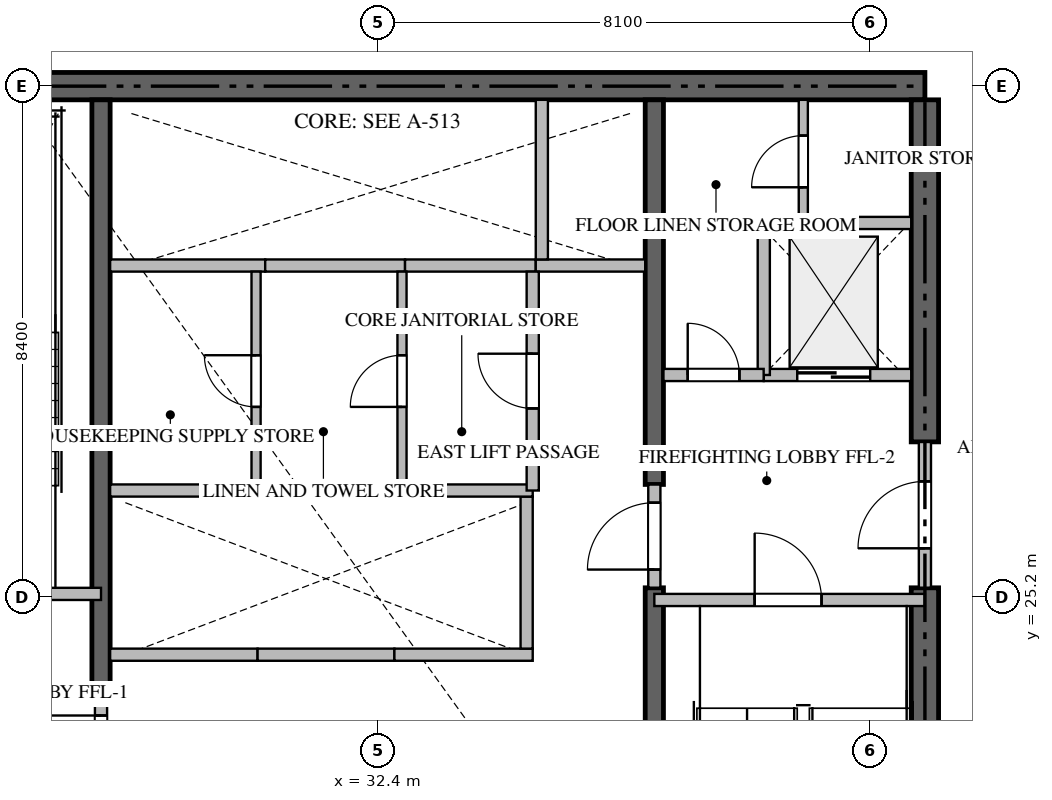
"""IFC4 building model, lengths in metres.
Left out: names, types, materials, properties, quantities, classifications, styles, units other than length and angle.
Written with IfcOpenShell. Run it as: python <this file> out.ifc"""

import sys

from ifc_helpers import new_model, si_unit, direction, frame, frame_2d, origin, place, context, subcontext, project, spatial, rectangle, extrude, source, transform, mapped, element, fill, save


model = new_model("IFC4")
c1 = context("Model", 3, precision=1e-05, world=origin(), true_north=direction((0.0, 1.0)))
c2 = subcontext(c1, "Body", "Model", "MODEL_VIEW")
j1 = project(units=[si_unit("LENGTHUNIT", "METRE"), si_unit("PLANEANGLEUNIT", "RADIAN")], contexts=[c1])
p1 = place(None, origin())
s1 = spatial("IfcSite", under=j1, at=p1, CompositionType="ELEMENT")
p2 = place(p1, origin())
s2 = spatial("IfcBuilding", under=s1, at=p2, CompositionType="ELEMENT")
p3 = place(p2, frame((0.0, 0.0, 97.95)))
s3 = spatial("IfcBuildingStorey", under=s2, at=p3, CompositionType="ELEMENT", Elevation=97.95)
p4 = place(p3, frame((41.4, 33.6, -0.26), z_axis=(0.0, 0.0, 1.0), x_axis=(-1.0, 0.0, 0.0)))
e1 = element("IfcWall", 1, at=p4, inside=s3, PredefinedType="SHEAR", context=c2, shape_type="SweptSolid", body=[
    extrude(rectangle(XDim=18.0, YDim=0.45, at=frame_2d((9.0, 0.0))), origin(), (0.0, 0.0, 1.0), 3.748),
])
p5 = place(p3, frame((41.4, 17.025, -0.26), z_axis=(0.0, 0.0, 1.0), x_axis=(0.0, 1.0, 0.0)))
e2 = element("IfcWall", 2, at=p5, inside=s3, PredefinedType="SHEAR", context=c2, shape_type="SweptSolid", body=[
    extrude(rectangle(XDim=8.325, YDim=0.45, at=frame_2d((4.163, 0.0))), origin(), (0.0, 0.0, 1.0), 3.748),
])
p6 = place(p3, frame((41.4, 27.75, -0.26), z_axis=(0.0, 0.0, 1.0), x_axis=(0.0, 1.0, 0.0)))
e3 = element("IfcWall", 3, at=p6, inside=s3, PredefinedType="SHEAR", context=c2, shape_type="SweptSolid", body=[
    extrude(rectangle(XDim=5.625, YDim=0.45, at=frame_2d((2.812, 0.0))), origin(), (0.0, 0.0, 1.0), 3.748),
])
p7 = place(p3, frame((27.85, 23.55, -0.26), z_axis=(0.0, 0.0, 1.0), x_axis=(0.0, 1.0, 0.0)))
e4 = element("IfcWall", 4, at=p7, inside=s3, PredefinedType="SHEAR", context=c2, shape_type="SweptSolid", body=[
    extrude(rectangle(XDim=9.825, YDim=0.3, at=frame_2d((4.913, 0.0))), origin(), (0.0, 0.0, 1.0), 3.748),
])
p8 = place(p3, frame((36.95, 17.025, -0.26), z_axis=(0.0, 0.0, 1.0), x_axis=(0.0, 1.0, 0.0)))
e5 = element("IfcWall", 5, at=p8, inside=s3, PredefinedType="SHEAR", context=c2, shape_type="SweptSolid", body=[
    extrude(rectangle(XDim=8.325, YDim=0.3, at=frame_2d((4.163, 0.0))), origin(), (0.0, 0.0, 1.0), 3.748),
])
p9 = place(p3, frame((36.95, 27.05, -0.26), z_axis=(0.0, 0.0, 1.0), x_axis=(0.0, 1.0, 0.0)))
e6 = element("IfcWall", 6, at=p9, inside=s3, PredefinedType="SHEAR", context=c2, shape_type="SweptSolid", body=[
    extrude(rectangle(XDim=6.325, YDim=0.3, at=frame_2d((3.163, 0.0))), origin(), (0.0, 0.0, 1.0), 3.748),
])
p10 = place(p3, frame((23.4, 25.25, 0.0), z_axis=(0.0, 0.0, 1.0), x_axis=(1.0, 0.0, 0.0)))
e7 = element("IfcWall", 7, at=p10, inside=s3, PredefinedType="STANDARD", context=c2, shape_type="SweptSolid", body=[
    extrude(rectangle(XDim=4.45, YDim=0.2, at=frame_2d((2.225, 0.0))), origin(), (0.0, 0.0, 1.0), 3.49),
])
p11 = place(p10, frame((1.65, 0.0, 0.0)))
e8 = element("IfcOpeningElement", 8, at=p11, cuts=e7, PredefinedType="OPENING", context=c2, shape_type="SweptSolid", body=[
    extrude(rectangle(XDim=1.1, YDim=2.15, at=frame_2d((0.55, 1.075))), frame((0.0, 0.11, 0.0), z_axis=(0.0, -1.0, 0.0), x_axis=(1.0, 0.0, 0.0)), (0.0, 0.0, 1.0), 0.22),
])
p12 = place(p3, frame((36.95, 25.15, 0.0), z_axis=(0.0, 0.0, 1.0), x_axis=(1.0, 0.0, 0.0)))
e9 = element("IfcWall", 9, at=p12, inside=s3, PredefinedType="STANDARD", context=c2, shape_type="SweptSolid", body=[
    extrude(rectangle(XDim=4.45, YDim=0.2, at=frame_2d((2.225, 0.0))), origin(), (0.0, 0.0, 1.0), 3.49),
])
p13 = place(p12, frame((1.65, 0.0, 0.0)))
e10 = element("IfcOpeningElement", 10, at=p13, cuts=e9, PredefinedType="OPENING", context=c2, shape_type="SweptSolid", body=[
    extrude(rectangle(XDim=1.1, YDim=2.15, at=frame_2d((0.55, 1.075))), frame((0.0, 0.11, 0.0), z_axis=(0.0, -1.0, 0.0), x_axis=(1.0, 0.0, 0.0)), (0.0, 0.0, 1.0), 0.22),
])
p14 = place(p3, frame((38.75, 28.85, 0.0), z_axis=(0.0, 0.0, 1.0), x_axis=(1.0, 0.0, 0.0)))
e11 = element("IfcWall", 11, at=p14, inside=s3, PredefinedType="STANDARD", context=c2, shape_type="SweptSolid", body=[
    extrude(rectangle(XDim=2.425, YDim=0.2, at=frame_2d((1.212, 0.0))), origin(), (0.0, 0.0, 1.0), 3.49),
])
p15 = place(p14, frame((0.55, 0.0, 0.0)))
e12 = element("IfcOpeningElement", 12, at=p15, cuts=e11, PredefinedType="OPENING", context=c2, shape_type="SweptSolid", body=[
    extrude(rectangle(XDim=1.2, YDim=2.2, at=frame_2d((0.6, 1.1))), frame((0.0, 0.11, 0.0), z_axis=(0.0, -1.0, 0.0), x_axis=(1.0, 0.0, 0.0)), (0.0, 0.0, 1.0), 0.22),
])
p16 = place(p3, frame((28.0, 24.25, 0.0), z_axis=(0.0, 0.0, 1.0), x_axis=(1.0, 0.0, 0.0)))
e13 = element("IfcWall", 13, at=p16, inside=s3, PredefinedType="STANDARD", context=c2, shape_type="SweptSolid", body=[
    extrude(rectangle(XDim=2.425, YDim=0.2, at=frame_2d((1.212, 0.0))), origin(), (0.0, 0.0, 1.0), 3.49),
])
p17 = place(p3, frame((30.425, 24.25, 0.0), z_axis=(0.0, 0.0, 1.0), x_axis=(1.0, 0.0, 0.0)))
e14 = element("IfcWall", 14, at=p17, inside=s3, PredefinedType="STANDARD", context=c2, shape_type="SweptSolid", body=[
    extrude(rectangle(XDim=2.25, YDim=0.2, at=frame_2d((1.125, 0.0))), origin(), (0.0, 0.0, 1.0), 3.49),
])
p18 = place(p3, frame((32.675, 24.25, 0.0), z_axis=(0.0, 0.0, 1.0), x_axis=(1.0, 0.0, 0.0)))
e15 = element("IfcWall", 15, at=p18, inside=s3, PredefinedType="STANDARD", context=c2, shape_type="SweptSolid", body=[
    extrude(rectangle(XDim=2.275, YDim=0.2, at=frame_2d((1.137, 0.0))), origin(), (0.0, 0.0, 1.0), 3.49),
])
p19 = place(p3, frame((34.85, 24.35, 0.0), z_axis=(0.0, 0.0, 1.0), x_axis=(0.0, 1.0, 0.0)))
e16 = element("IfcWall", 16, at=p19, inside=s3, PredefinedType="STANDARD", context=c2, shape_type="SweptSolid", body=[
    extrude(rectangle(XDim=2.5, YDim=0.2, at=frame_2d((1.25, 0.0))), origin(), (0.0, 0.0, 1.0), 3.49),
])
p20 = place(p3, frame((28.0, 30.65, 0.0), z_axis=(0.0, 0.0, 1.0), x_axis=(1.0, 0.0, 0.0)))
e17 = element("IfcWall", 17, at=p20, inside=s3, PredefinedType="STANDARD", context=c2, shape_type="SweptSolid", body=[
    extrude(rectangle(XDim=2.55, YDim=0.2, at=frame_2d((1.275, 0.0))), origin(), (0.0, 0.0, 1.0), 3.49),
])
p21 = place(p3, frame((30.55, 30.65, 0.0), z_axis=(0.0, 0.0, 1.0), x_axis=(1.0, 0.0, 0.0)))
e18 = element("IfcWall", 18, at=p21, inside=s3, PredefinedType="STANDARD", context=c2, shape_type="SweptSolid", body=[
    extrude(rectangle(XDim=2.3, YDim=0.2, at=frame_2d((1.15, 0.0))), origin(), (0.0, 0.0, 1.0), 3.49),
])
p22 = place(p3, frame((32.85, 30.65, 0.0), z_axis=(0.0, 0.0, 1.0), x_axis=(1.0, 0.0, 0.0)))
e19 = element("IfcWall", 19, at=p22, inside=s3, PredefinedType="STANDARD", context=c2, shape_type="SweptSolid", body=[
    extrude(rectangle(XDim=2.15, YDim=0.2, at=frame_2d((1.075, 0.0))), origin(), (0.0, 0.0, 1.0), 3.49),
])
p23 = place(p3, frame((35.0, 30.65, 0.0), z_axis=(0.0, 0.0, 1.0), x_axis=(1.0, 0.0, 0.0)))
e20 = element("IfcWall", 20, at=p23, inside=s3, PredefinedType="STANDARD", context=c2, shape_type="SweptSolid", body=[
    extrude(rectangle(XDim=1.8, YDim=0.2, at=frame_2d((0.9, 0.0))), origin(), (0.0, 0.0, 1.0), 3.49),
])
p24 = place(p3, frame((35.1, 30.75, 0.0), z_axis=(0.0, 0.0, 1.0), x_axis=(0.0, 1.0, 0.0)))
e21 = element("IfcWall", 21, at=p24, inside=s3, PredefinedType="STANDARD", context=c2, shape_type="SweptSolid", body=[
    extrude(rectangle(XDim=2.625, YDim=0.2, at=frame_2d((1.312, 0.0))), origin(), (0.0, 0.0, 1.0), 3.49),
])
p25 = place(p3, frame((38.75, 28.85, 0.0), z_axis=(0.0, 0.0, 1.0), x_axis=(0.0, 1.0, 0.0)))
e22 = element("IfcWall", 22, at=p25, inside=s3, PredefinedType="STANDARD", context=c2, shape_type="SweptSolid", body=[
    extrude(rectangle(XDim=2.5, YDim=0.2, at=frame_2d((1.25, 0.0))), origin(), (0.0, 0.0, 1.0), 3.49),
])
p26 = place(p3, frame((38.75, 31.35, 0.0), z_axis=(0.0, 0.0, 1.0), x_axis=(1.0, 0.0, 0.0)))
e23 = element("IfcWall", 23, at=p26, inside=s3, PredefinedType="STANDARD", context=c2, shape_type="SweptSolid", body=[
    extrude(rectangle(XDim=2.425, YDim=0.2, at=frame_2d((1.212, 0.0))), origin(), (0.0, 0.0, 1.0), 3.49),
])
p27 = place(p3, frame((37.1, 28.85, 0.0), z_axis=(0.0, 0.0, 1.0), x_axis=(1.0, 0.0, 0.0)))
e24 = element("IfcWall", 24, at=p27, inside=s3, PredefinedType="STANDARD", context=c2, shape_type="SweptSolid", body=[
    extrude(rectangle(XDim=1.648, YDim=0.2, at=frame_2d((0.824, 0.0))), origin(), (0.0, 0.0, 1.0), 3.49),
])
p28 = place(p27, frame((0.399, 0.0, 0.0)))
e25 = element("IfcOpeningElement", 25, at=p28, cuts=e24, PredefinedType="OPENING", context=c2, shape_type="SweptSolid", body=[
    extrude(rectangle(XDim=0.85, YDim=2.1, at=frame_2d((0.425, 1.05))), frame((0.0, 0.11, 0.0), z_axis=(0.0, -1.0, 0.0), x_axis=(1.0, 0.0, 0.0)), (0.0, 0.0, 1.0), 0.22),
])
p29 = place(p3, frame((41.4, 25.352, 0.0), z_axis=(0.0, 0.0, 1.0), x_axis=(0.0, 1.0, 0.0)))
e26 = element("IfcWall", 26, at=p29, inside=s3, PredefinedType="STANDARD", context=c2, shape_type="SweptSolid", body=[
    extrude(rectangle(XDim=2.396, YDim=0.2, at=frame_2d((1.198, 0.0))), origin(), (0.0, 0.0, 1.0), 3.49),
])
p30 = place(p29, frame((0.648, 0.0, 0.0)))
e27 = element("IfcOpeningElement", 27, at=p30, cuts=e26, PredefinedType="OPENING", context=c2, shape_type="SweptSolid", body=[
    extrude(rectangle(XDim=1.1, YDim=2.15, at=frame_2d((0.55, 1.075))), frame((0.0, 0.11, 0.0), z_axis=(0.0, -1.0, 0.0), x_axis=(1.0, 0.0, 0.0)), (0.0, 0.0, 1.0), 0.22),
])
p31 = place(p3, frame((27.85, 21.852, 0.0), z_axis=(0.0, 0.0, 1.0), x_axis=(0.0, 1.0, 0.0)))
e28 = element("IfcWall", 28, at=p31, inside=s3, PredefinedType="STANDARD", context=c2, shape_type="SweptSolid", body=[
    extrude(rectangle(XDim=1.696, YDim=0.2, at=frame_2d((0.848, 0.0))), origin(), (0.0, 0.0, 1.0), 3.49),
])
p32 = place(p31, frame((0.298, 0.0, 0.0)))
e29 = element("IfcOpeningElement", 29, at=p32, cuts=e28, PredefinedType="OPENING", context=c2, shape_type="SweptSolid", body=[
    extrude(rectangle(XDim=1.1, YDim=2.15, at=frame_2d((0.55, 1.075))), frame((0.0, 0.11, 0.0), z_axis=(0.0, -1.0, 0.0), x_axis=(1.0, 0.0, 0.0)), (0.0, 0.0, 1.0), 0.22),
])
p33 = place(p3, frame((36.95, 25.352, 0.0), z_axis=(0.0, 0.0, 1.0), x_axis=(0.0, 1.0, 0.0)))
e30 = element("IfcWall", 30, at=p33, inside=s3, PredefinedType="STANDARD", context=c2, shape_type="SweptSolid", body=[
    extrude(rectangle(XDim=1.696, YDim=0.2, at=frame_2d((0.848, 0.0))), origin(), (0.0, 0.0, 1.0), 3.49),
])
p34 = place(p33, frame((0.298, 0.0, 0.0)))
e31 = element("IfcOpeningElement", 31, at=p34, cuts=e30, PredefinedType="OPENING", context=c2, shape_type="SweptSolid", body=[
    extrude(rectangle(XDim=1.1, YDim=2.15, at=frame_2d((0.55, 1.075))), frame((0.0, 0.11, 0.0), z_axis=(0.0, -1.0, 0.0), x_axis=(1.0, 0.0, 0.0)), (0.0, 0.0, 1.0), 0.22),
])
p35 = place(p3, frame((28.0, 26.95, 0.0), z_axis=(0.0, 0.0, 1.0), x_axis=(1.0, 0.0, 0.0)))
e32 = element("IfcWall", 32, at=p35, inside=s3, PredefinedType="STANDARD", context=c2, shape_type="SweptSolid", body=[
    extrude(rectangle(XDim=6.95, YDim=0.2, at=frame_2d((3.475, 0.0))), origin(), (0.0, 0.0, 1.0), 3.49),
])
p36 = place(p3, frame((39.4, 31.35, 0.0), z_axis=(0.0, 0.0, 1.0), x_axis=(0.0, 1.0, 0.0)))
e33 = element("IfcWall", 33, at=p36, inside=s3, PredefinedType="PARTITIONING", context=c2, shape_type="SweptSolid", body=[
    extrude(rectangle(XDim=2.025, YDim=0.15, at=frame_2d((1.012, 0.0))), origin(), (0.0, 0.0, 1.0), 3.49),
])
p37 = place(p36, frame((0.587, 0.0, 0.0)))
e34 = element("IfcOpeningElement", 34, at=p37, cuts=e33, PredefinedType="OPENING", context=c2, shape_type="SweptSolid", body=[
    extrude(rectangle(XDim=0.85, YDim=2.1, at=frame_2d((0.425, 1.05))), frame((0.0, 0.085, 0.0), z_axis=(0.0, -1.0, 0.0), x_axis=(1.0, 0.0, 0.0)), (0.0, 0.0, 1.0), 0.17),
])
p38 = place(p3, frame((34.95, 26.95, 0.0), z_axis=(0.0, 0.0, 1.0), x_axis=(0.0, 1.0, 0.0)))
e35 = element("IfcWall", 35, at=p38, inside=s3, PredefinedType="STANDARD", context=c2, shape_type="SweptSolid", body=[
    extrude(rectangle(XDim=3.6, YDim=0.2, at=frame_2d((1.8, 0.0))), origin(), (0.0, 0.0, 1.0), 3.49),
])
p39 = place(p38, frame((1.35, 0.0, 0.0)))
e36 = element("IfcOpeningElement", 36, at=p39, cuts=e35, PredefinedType="OPENING", context=c2, shape_type="SweptSolid", body=[
    extrude(rectangle(XDim=0.9, YDim=2.1, at=frame_2d((0.45, 1.05))), frame((0.0, 0.11, 0.0), z_axis=(0.0, -1.0, 0.0), x_axis=(1.0, 0.0, 0.0)), (0.0, 0.0, 1.0), 0.22),
])
p40 = place(p3, frame((32.8, 26.95, 0.0), z_axis=(0.0, 0.0, 1.0), x_axis=(0.0, 1.0, 0.0)))
e37 = element("IfcWall", 37, at=p40, inside=s3, PredefinedType="PARTITIONING", context=c2, shape_type="SweptSolid", body=[
    extrude(rectangle(XDim=3.6, YDim=0.15, at=frame_2d((1.8, 0.0))), origin(), (0.0, 0.0, 1.0), 3.49),
])
p41 = place(p40, frame((1.375, 0.0, 0.0)))
e38 = element("IfcOpeningElement", 38, at=p41, cuts=e37, PredefinedType="OPENING", context=c2, shape_type="SweptSolid", body=[
    extrude(rectangle(XDim=0.85, YDim=2.1, at=frame_2d((0.425, 1.05))), frame((0.0, 0.085, 0.0), z_axis=(0.0, -1.0, 0.0), x_axis=(1.0, 0.0, 0.0)), (0.0, 0.0, 1.0), 0.17),
])
p42 = place(p3, frame((30.4, 26.95, 0.0), z_axis=(0.0, 0.0, 1.0), x_axis=(0.0, 1.0, 0.0)))
e39 = element("IfcWall", 39, at=p42, inside=s3, PredefinedType="PARTITIONING", context=c2, shape_type="SweptSolid", body=[
    extrude(rectangle(XDim=3.6, YDim=0.15, at=frame_2d((1.8, 0.0))), origin(), (0.0, 0.0, 1.0), 3.49),
])
p43 = place(p42, frame((1.375, 0.0, 0.0)))
e40 = element("IfcOpeningElement", 40, at=p43, cuts=e39, PredefinedType="OPENING", context=c2, shape_type="SweptSolid", body=[
    extrude(rectangle(XDim=0.85, YDim=2.1, at=frame_2d((0.425, 1.05))), frame((0.0, 0.085, 0.0), z_axis=(0.0, -1.0, 0.0), x_axis=(1.0, 0.0, 0.0)), (0.0, 0.0, 1.0), 0.17),
])
m1 = source(origin(), c2, "Body", "SweptSolid", [
    extrude(rectangle(XDim=1.1, YDim=2.15, at=frame_2d((0.55, 1.075))), frame((0.0, 0.025, 0.0), z_axis=(0.0, -1.0, 0.0), x_axis=(1.0, 0.0, 0.0)), (0.0, 0.0, 1.0), 0.05),
])
p44 = place(p13, origin())
e41 = element("IfcDoor", 41, at=p44, inside=s3, OperationType="SINGLE_SWING_LEFT", PredefinedType="DOOR", context=c2, shape_type="MappedRepresentation", body=[
    mapped(m1, transform((0.0, 0.0, 0.0), scale=1.0)),
])
fill(e10, e41)
m2 = source(origin(), c2, "Body", "SweptSolid", [
    extrude(rectangle(XDim=1.2, YDim=2.2, at=frame_2d((0.6, 1.1))), frame((0.0, 0.025, 0.0), z_axis=(0.0, -1.0, 0.0), x_axis=(1.0, 0.0, 0.0)), (0.0, 0.0, 1.0), 0.05),
])
p45 = place(p15, origin())
e42 = element("IfcDoor", 42, at=p45, inside=s3, OperationType="DOUBLE_DOOR_SLIDING", PredefinedType="DOOR", context=c2, shape_type="MappedRepresentation", body=[
    mapped(m2, transform((0.0, 0.0, 0.0), scale=1.0)),
])
fill(e12, e42)
m3 = source(origin(), c2, "Body", "SweptSolid", [
    extrude(rectangle(XDim=0.85, YDim=2.1, at=frame_2d((0.425, 1.05))), frame((0.0, 0.025, 0.0), z_axis=(0.0, -1.0, 0.0), x_axis=(1.0, 0.0, 0.0)), (0.0, 0.0, 1.0), 0.05),
])
p46 = place(p28, origin())
e43 = element("IfcDoor", 43, at=p46, inside=s3, OperationType="SINGLE_SWING_LEFT", PredefinedType="DOOR", context=c2, shape_type="MappedRepresentation", body=[
    mapped(m3, transform((0.0, 0.0, 0.0), scale=1.0)),
])
fill(e25, e43)
p47 = place(p30, origin())
e44 = element("IfcDoor", 44, at=p47, inside=s3, OperationType="SINGLE_SWING_LEFT", PredefinedType="DOOR", context=c2, shape_type="MappedRepresentation", body=[
    mapped(m1, transform((0.0, 0.0, 0.0), scale=1.0)),
])
fill(e27, e44)
p48 = place(p32, origin())
e45 = element("IfcDoor", 45, at=p48, inside=s3, OperationType="SINGLE_SWING_RIGHT", PredefinedType="DOOR", context=c2, shape_type="MappedRepresentation", body=[
    mapped(m1, transform((0.0, 0.0, 0.0), scale=1.0)),
])
fill(e29, e45)
p49 = place(p34, origin())
e46 = element("IfcDoor", 46, at=p49, inside=s3, OperationType="SINGLE_SWING_LEFT", PredefinedType="DOOR", context=c2, shape_type="MappedRepresentation", body=[
    mapped(m1, transform((0.0, 0.0, 0.0), scale=1.0)),
])
fill(e31, e46)
p50 = place(p37, origin())
e47 = element("IfcDoor", 47, at=p50, inside=s3, OperationType="SINGLE_SWING_LEFT", PredefinedType="DOOR", context=c2, shape_type="MappedRepresentation", body=[
    mapped(m3, transform((0.0, 0.0, 0.0), scale=1.0)),
])
fill(e34, e47)
m4 = source(origin(), c2, "Body", "SweptSolid", [
    extrude(rectangle(XDim=0.9, YDim=2.1, at=frame_2d((0.45, 1.05))), frame((0.0, 0.025, 0.0), z_axis=(0.0, -1.0, 0.0), x_axis=(1.0, 0.0, 0.0)), (0.0, 0.0, 1.0), 0.05),
])
p51 = place(p39, origin())
e48 = element("IfcDoor", 48, at=p51, inside=s3, OperationType="SINGLE_SWING_RIGHT", PredefinedType="DOOR", context=c2, shape_type="MappedRepresentation", body=[
    mapped(m4, transform((0.0, 0.0, 0.0), scale=1.0)),
])
fill(e36, e48)
p52 = place(p41, origin())
e49 = element("IfcDoor", 49, at=p52, inside=s3, OperationType="SINGLE_SWING_LEFT", PredefinedType="DOOR", context=c2, shape_type="MappedRepresentation", body=[
    mapped(m3, transform((0.0, 0.0, 0.0), scale=1.0)),
])
fill(e38, e49)
p53 = place(p43, origin())
e50 = element("IfcDoor", 50, at=p53, inside=s3, OperationType="SINGLE_SWING_RIGHT", PredefinedType="DOOR", context=c2, shape_type="MappedRepresentation", body=[
    mapped(m3, transform((0.0, 0.0, 0.0), scale=1.0)),
])
fill(e40, e50)
save(model, sys.argv[1])
